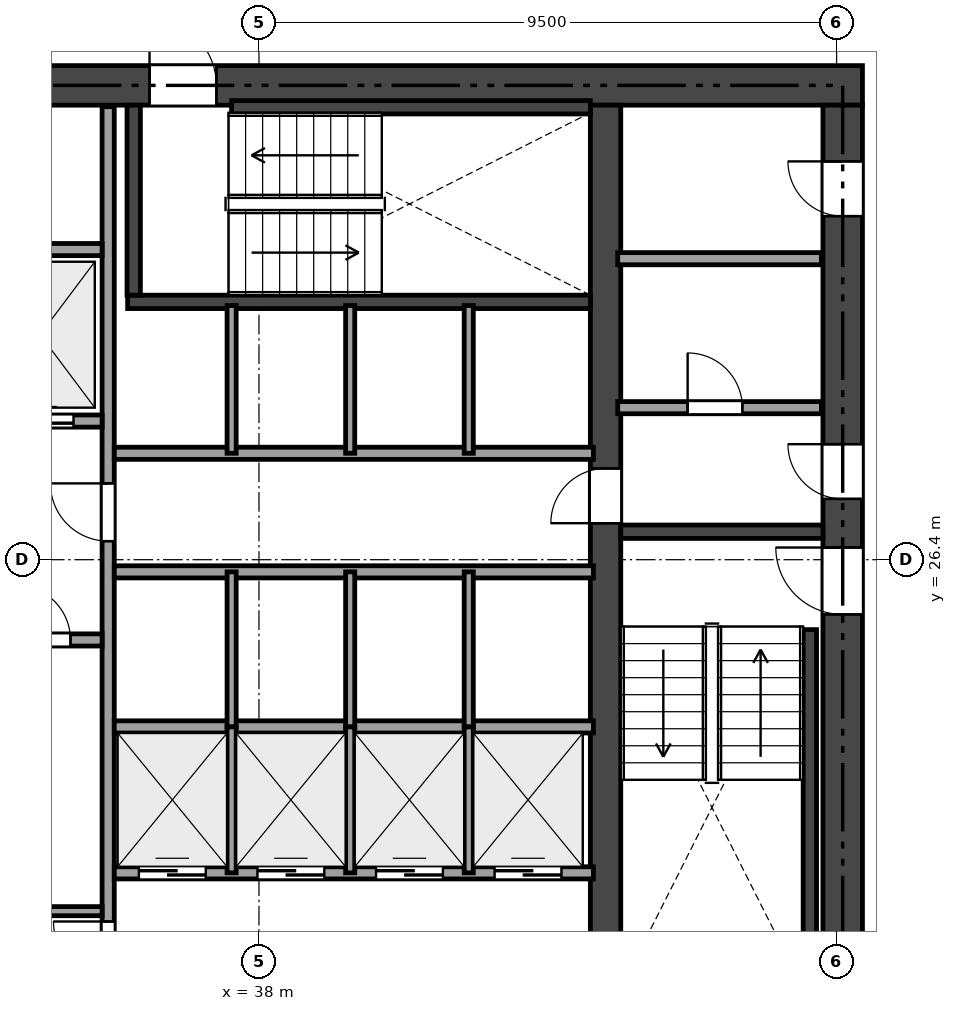
"""IFC4 building model, lengths in metres.
Left out: names, types, materials, properties, quantities, classifications, styles, units other than length and angle.
Written with IfcOpenShell. Run it as: python <this file> out.ifc"""

import sys

from ifc_helpers import new_model, si_unit, direction, frame, frame_2d, origin, place, context, subcontext, project, spatial, rectangle, extrude, element, fill, save


model = new_model("IFC4")
c1 = context("Model", 3, precision=1e-05, world=origin(), true_north=direction((0.0, 1.0)))
c2 = subcontext(c1, "Body", "Model", "MODEL_VIEW")
j1 = project(units=[si_unit("LENGTHUNIT", "METRE"), si_unit("PLANEANGLEUNIT", "RADIAN")], contexts=[c1])
p1 = place(None, origin())
s1 = spatial("IfcSite", under=j1, at=p1, CompositionType="ELEMENT")
p2 = place(p1, origin())
s2 = spatial("IfcBuilding", under=s1, at=p2, CompositionType="ELEMENT")
p3 = place(p2, frame((0.0, 0.0, 54.6)))
s3 = spatial("IfcBuildingStorey", under=s2, at=p3, CompositionType="ELEMENT", Elevation=54.6)
p4 = place(p3, frame((26.475, 34.2, 0.0), z_axis=(0.0, 0.0, 1.0), x_axis=(1.0, 0.0, 0.0)))
e1 = element("IfcWall", 1, at=p4, inside=s3, PredefinedType="SHEAR", context=c2, shape_type="SweptSolid", body=[
    extrude(rectangle(XDim=21.45, YDim=0.65, at=frame_2d((10.725, 0.0))), origin(), (0.0, 0.0, 1.0), 3.17),
])
p5 = place(p4, frame((9.725, 0.0, 0.0)))
e2 = element("IfcOpeningElement", 2, at=p5, cuts=e1, PredefinedType="OPENING", context=c2, shape_type="SweptSolid", body=[
    extrude(rectangle(XDim=1.1, YDim=2.15, at=frame_2d((0.55, 1.075))), frame((0.0, 0.335, 0.0), z_axis=(0.0, -1.0, 0.0), x_axis=(1.0, 0.0, 0.0)), (0.0, 0.0, 1.0), 0.67),
])
p6 = place(p4, frame((1.975, 0.0, 0.0)))
e3 = element("IfcOpeningElement", 3, at=p6, cuts=e1, PredefinedType="OPENING", context=c2, shape_type="SweptSolid", body=[
    extrude(rectangle(XDim=0.9, YDim=2.1, at=frame_2d((0.45, 1.05))), frame((0.0, 0.335, 0.0), z_axis=(0.0, -1.0, 0.0), x_axis=(1.0, 0.0, 0.0)), (0.0, 0.0, 1.0), 0.67),
])
p7 = place(p4, frame((6.275, 0.0, 0.0)))
e4 = element("IfcOpeningElement", 4, at=p7, cuts=e1, PredefinedType="OPENING", context=c2, shape_type="SweptSolid", body=[
    extrude(rectangle(XDim=0.9, YDim=2.1, at=frame_2d((0.45, 1.05))), frame((0.0, 0.335, 0.0), z_axis=(0.0, -1.0, 0.0), x_axis=(1.0, 0.0, 0.0)), (0.0, 0.0, 1.0), 0.67),
])
p8 = place(p3, frame((47.6, 18.925, 0.0), z_axis=(0.0, 0.0, 1.0), x_axis=(0.0, 1.0, 0.0)))
e5 = element("IfcWall", 5, at=p8, inside=s3, PredefinedType="SHEAR", context=c2, shape_type="SweptSolid", body=[
    extrude(rectangle(XDim=14.95, YDim=0.65, at=frame_2d((7.475, 0.0))), origin(), (0.0, 0.0, 1.0), 3.17),
])
p9 = place(p8, frame((6.575, 0.0, 0.0)))
e6 = element("IfcOpeningElement", 6, at=p9, cuts=e5, PredefinedType="OPENING", context=c2, shape_type="SweptSolid", body=[
    extrude(rectangle(XDim=1.1, YDim=2.15, at=frame_2d((0.55, 1.075))), frame((0.0, 0.335, 0.0), z_axis=(0.0, -1.0, 0.0), x_axis=(1.0, 0.0, 0.0)), (0.0, 0.0, 1.0), 0.67),
])
p10 = place(p8, frame((8.475, 0.0, 0.0)))
e7 = element("IfcOpeningElement", 7, at=p10, cuts=e5, PredefinedType="OPENING", context=c2, shape_type="SweptSolid", body=[
    extrude(rectangle(XDim=0.9, YDim=2.1, at=frame_2d((0.45, 1.05))), frame((0.0, 0.335, 0.0), z_axis=(0.0, -1.0, 0.0), x_axis=(1.0, 0.0, 0.0)), (0.0, 0.0, 1.0), 0.67),
])
p11 = place(p8, frame((13.125, 0.0, 0.0)))
e8 = element("IfcOpeningElement", 8, at=p11, cuts=e5, PredefinedType="OPENING", context=c2, shape_type="SweptSolid", body=[
    extrude(rectangle(XDim=0.9, YDim=2.1, at=frame_2d((0.45, 1.05))), frame((0.0, 0.335, 0.0), z_axis=(0.0, -1.0, 0.0), x_axis=(1.0, 0.0, 0.0)), (0.0, 0.0, 1.0), 0.67),
])
p12 = place(p3, frame((43.7, 18.925, 0.0), z_axis=(0.0, 0.0, 1.0), x_axis=(0.0, 1.0, 0.0)))
e9 = element("IfcWall", 9, at=p12, inside=s3, PredefinedType="SHEAR", context=c2, shape_type="SweptSolid", body=[
    extrude(rectangle(XDim=14.95, YDim=0.5, at=frame_2d((7.475, 0.0))), origin(), (0.0, 0.0, 1.0), 3.17),
])
p13 = place(p12, frame((8.075, 0.0, 0.0)))
e10 = element("IfcOpeningElement", 10, at=p13, cuts=e9, PredefinedType="OPENING", context=c2, shape_type="SweptSolid", body=[
    extrude(rectangle(XDim=0.9, YDim=2.1, at=frame_2d((0.45, 1.05))), frame((0.0, 0.26, 0.0), z_axis=(0.0, -1.0, 0.0), x_axis=(1.0, 0.0, 0.0)), (0.0, 0.0, 1.0), 0.52),
])
p14 = place(p3, frame((43.95, 26.86, 0.0), z_axis=(0.0, 0.0, 1.0), x_axis=(1.0, 0.0, 0.0)))
e11 = element("IfcWall", 11, at=p14, inside=s3, PredefinedType="SHEAR", context=c2, shape_type="SweptSolid", body=[
    extrude(rectangle(XDim=3.325, YDim=0.22, at=frame_2d((1.663, 0.0))), origin(), (0.0, 0.0, 1.0), 3.17),
])
p15 = place(p3, frame((47.06, 19.35, 0.0), z_axis=(0.0, 0.0, 1.0), x_axis=(0.0, 1.0, 0.0)))
e12 = element("IfcWall", 12, at=p15, inside=s3, PredefinedType="SHEAR", context=c2, shape_type="SweptSolid", body=[
    extrude(rectangle(XDim=5.9, YDim=0.22, at=frame_2d((2.95, 0.0))), origin(), (0.0, 0.0, 1.0), 3.17),
])
p16 = place(p3, frame((35.84, 30.64, 0.0), z_axis=(0.0, 0.0, 1.0), x_axis=(1.0, 0.0, 0.0)))
e13 = element("IfcWall", 13, at=p16, inside=s3, PredefinedType="SHEAR", context=c2, shape_type="SweptSolid", body=[
    extrude(rectangle(XDim=7.61, YDim=0.22, at=frame_2d((3.805, 0.0))), origin(), (0.0, 0.0, 1.0), 3.17),
])
p17 = place(p3, frame((35.94, 30.75, 0.0), z_axis=(0.0, 0.0, 1.0), x_axis=(0.0, 1.0, 0.0)))
e14 = element("IfcWall", 14, at=p17, inside=s3, PredefinedType="SHEAR", context=c2, shape_type="SweptSolid", body=[
    extrude(rectangle(XDim=3.125, YDim=0.22, at=frame_2d((1.562, 0.0))), origin(), (0.0, 0.0, 1.0), 3.17),
])
p18 = place(p3, frame((37.55, 33.84, 0.0), z_axis=(0.0, 0.0, 1.0), x_axis=(1.0, 0.0, 0.0)))
e15 = element("IfcWall", 15, at=p18, inside=s3, PredefinedType="SHEAR", context=c2, shape_type="SweptSolid", body=[
    extrude(rectangle(XDim=5.9, YDim=0.22, at=frame_2d((2.95, 0.0))), origin(), (0.0, 0.0, 1.0), 3.17),
])
p19 = place(p3, frame((43.9, 28.9, 0.0), z_axis=(0.0, 0.0, 1.0), x_axis=(1.0, 0.0, 0.0)))
e16 = element("IfcWall", 16, at=p19, inside=s3, PredefinedType="SOLIDWALL", context=c2, shape_type="SweptSolid", body=[
    extrude(rectangle(XDim=3.35, YDim=0.2, at=frame_2d((1.675, 0.0))), origin(), (0.0, 0.0, 1.0), 3.17),
])
p20 = place(p19, frame((1.15, 0.0, 0.0)))
e17 = element("IfcOpeningElement", 17, at=p20, cuts=e16, PredefinedType="OPENING", context=c2, shape_type="SweptSolid", body=[
    extrude(rectangle(XDim=0.9, YDim=2.1, at=frame_2d((0.45, 1.05))), frame((0.0, 0.11, 0.0), z_axis=(0.0, -1.0, 0.0), x_axis=(1.0, 0.0, 0.0)), (0.0, 0.0, 1.0), 0.22),
])
p21 = place(p3, frame((43.9, 31.35, 0.0), z_axis=(0.0, 0.0, 1.0), x_axis=(1.0, 0.0, 0.0)))
e18 = element("IfcWall", 18, at=p21, inside=s3, PredefinedType="SOLIDWALL", context=c2, shape_type="SweptSolid", body=[
    extrude(rectangle(XDim=3.35, YDim=0.2, at=frame_2d((1.675, 0.0))), origin(), (0.0, 0.0, 1.0), 3.17),
])
p22 = place(p3, frame((35.52, 18.95, 0.0), z_axis=(0.0, 0.0, 1.0), x_axis=(0.0, 1.0, 0.0)))
e19 = element("IfcWall", 19, at=p22, inside=s3, PredefinedType="SOLIDWALL", context=c2, shape_type="SweptSolid", body=[
    extrude(rectangle(XDim=14.9, YDim=0.2, at=frame_2d((7.45, 0.0))), origin(), (0.0, 0.0, 1.0), 2.691),
])
p23 = place(p22, frame((7.755, 0.0, 0.0)))
e20 = element("IfcOpeningElement", 20, at=p23, cuts=e19, PredefinedType="OPENING", context=c2, shape_type="SweptSolid", body=[
    extrude(rectangle(XDim=0.95, YDim=2.15, at=frame_2d((0.475, 1.075))), frame((0.0, 0.11, 0.0), z_axis=(0.0, -1.0, 0.0), x_axis=(1.0, 0.0, 0.0)), (0.0, 0.0, 1.0), 0.22),
])
p24 = place(p22, frame((0.6, 0.0, 0.0)))
e21 = element("IfcOpeningElement", 21, at=p24, cuts=e19, PredefinedType="OPENING", context=c2, shape_type="SweptSolid", body=[
    extrude(rectangle(XDim=0.9, YDim=2.1, at=frame_2d((0.45, 1.05))), frame((0.0, 0.11, 0.0), z_axis=(0.0, -1.0, 0.0), x_axis=(1.0, 0.0, 0.0)), (0.0, 0.0, 1.0), 0.22),
])
p25 = place(p3, frame((31.0, 28.68, 0.0), z_axis=(0.0, 0.0, 1.0), x_axis=(1.0, 0.0, 0.0)))
e22 = element("IfcWall", 22, at=p25, inside=s3, PredefinedType="SOLIDWALL", context=c2, shape_type="SweptSolid", body=[
    extrude(rectangle(XDim=4.42, YDim=0.2, at=frame_2d((2.21, 0.0))), origin(), (0.0, 0.0, 1.0), 3.17),
])
p26 = place(p25, frame((0.6, 0.0, 0.0)))
e23 = element("IfcOpeningElement", 23, at=p26, cuts=e22, PredefinedType="OPENING", context=c2, shape_type="SweptSolid", body=[
    extrude(rectangle(XDim=1.1, YDim=2.15, at=frame_2d((0.55, 1.075))), frame((0.0, 0.11, 0.0), z_axis=(0.0, -1.0, 0.0), x_axis=(1.0, 0.0, 0.0)), (0.0, 0.0, 1.0), 0.22),
])
p27 = place(p25, frame((2.85, 0.0, 0.0)))
e24 = element("IfcOpeningElement", 24, at=p27, cuts=e22, PredefinedType="OPENING", context=c2, shape_type="SweptSolid", body=[
    extrude(rectangle(XDim=1.1, YDim=2.15, at=frame_2d((0.55, 1.075))), frame((0.0, 0.11, 0.0), z_axis=(0.0, -1.0, 0.0), x_axis=(1.0, 0.0, 0.0)), (0.0, 0.0, 1.0), 0.22),
])
p28 = place(p3, frame((31.0, 31.5, 0.0), z_axis=(0.0, 0.0, 1.0), x_axis=(1.0, 0.0, 0.0)))
e25 = element("IfcWall", 25, at=p28, inside=s3, PredefinedType="SOLIDWALL", context=c2, shape_type="SweptSolid", body=[
    extrude(rectangle(XDim=4.42, YDim=0.2, at=frame_2d((2.21, 0.0))), origin(), (0.0, 0.0, 1.0), 3.17),
])
p29 = place(p3, frame((31.0, 25.08, 0.0), z_axis=(0.0, 0.0, 1.0), x_axis=(1.0, 0.0, 0.0)))
e26 = element("IfcWall", 26, at=p29, inside=s3, PredefinedType="SOLIDWALL", context=c2, shape_type="SweptSolid", body=[
    extrude(rectangle(XDim=4.42, YDim=0.2, at=frame_2d((2.21, 0.0))), origin(), (0.0, 0.0, 1.0), 3.17),
])
p30 = place(p29, frame((3.0, 0.0, 0.0)))
e27 = element("IfcOpeningElement", 27, at=p30, cuts=e26, PredefinedType="OPENING", context=c2, shape_type="SweptSolid", body=[
    extrude(rectangle(XDim=0.9, YDim=2.1, at=frame_2d((0.45, 1.05))), frame((0.0, 0.11, 0.0), z_axis=(0.0, -1.0, 0.0), x_axis=(1.0, 0.0, 0.0)), (0.0, 0.0, 1.0), 0.22),
])
p31 = place(p29, frame((0.62, 0.0, 0.0)))
e28 = element("IfcOpeningElement", 28, at=p31, cuts=e26, PredefinedType="OPENING", context=c2, shape_type="SweptSolid", body=[
    extrude(rectangle(XDim=1.2, YDim=2.15, at=frame_2d((0.6, 1.075))), frame((0.0, 0.11, 0.0), z_axis=(0.0, -1.0, 0.0), x_axis=(1.0, 0.0, 0.0)), (0.0, 0.0, 1.0), 0.22),
])
p32 = place(p3, frame((33.42, 20.62, 0.0), z_axis=(0.0, 0.0, 1.0), x_axis=(1.0, 0.0, 0.0)))
e29 = element("IfcWall", 29, at=p32, inside=s3, PredefinedType="PARTITIONING", context=c2, shape_type="SweptSolid", body=[
    extrude(rectangle(XDim=2.0, YDim=0.15, at=frame_2d((1.0, 0.0))), origin(), (0.0, 0.0, 1.0), 3.17),
])
for number, where, z_axis, x_axis in (
    (30, (35.62, 28.15, 0.0), (0.0, 0.0, 1.0), (1.0, 0.0, 0.0)),
    (31, (35.62, 26.2, 0.0), (0.0, 0.0, 1.0), (1.0, 0.0, 0.0)),
):
    element("IfcWall", number, at=place(p3, frame(where, z_axis=z_axis, x_axis=x_axis)), inside=s3, PredefinedType="SOLIDWALL", context=c2, shape_type="SweptSolid", body=[
        extrude(rectangle(XDim=7.88, YDim=0.2, at=frame_2d((3.94, 0.0))), origin(), (0.0, 0.0, 1.0), 3.17),
    ])
p33 = place(p3, frame((35.62, 23.65, 0.0), z_axis=(0.0, 0.0, 1.0), x_axis=(1.0, 0.0, 0.0)))
e32 = element("IfcWall", 32, at=p33, inside=s3, PredefinedType="SOLIDWALL", context=c2, shape_type="SweptSolid", body=[
    extrude(rectangle(XDim=7.88, YDim=0.2, at=frame_2d((3.94, 0.0))), origin(), (0.0, 0.0, 1.0), 2.691),
])
p34 = place(p3, frame((35.62, 21.25, 0.0), z_axis=(0.0, 0.0, 1.0), x_axis=(1.0, 0.0, 0.0)))
e33 = element("IfcWall", 33, at=p34, inside=s3, PredefinedType="SOLIDWALL", context=c2, shape_type="SweptSolid", body=[
    extrude(rectangle(XDim=7.88, YDim=0.2, at=frame_2d((3.94, 0.0))), origin(), (0.0, 0.0, 1.0), 3.17),
])
p35 = place(p34, frame((0.405, 0.0, 0.0)))
e34 = element("IfcOpeningElement", 34, at=p35, cuts=e33, PredefinedType="OPENING", context=c2, shape_type="SweptSolid", body=[
    extrude(rectangle(XDim=1.1, YDim=2.15, at=frame_2d((0.55, 1.075))), frame((0.0, 0.11, 0.0), z_axis=(0.0, -1.0, 0.0), x_axis=(1.0, 0.0, 0.0)), (0.0, 0.0, 1.0), 0.22),
])
p36 = place(p34, frame((2.355, 0.0, 0.0)))
e35 = element("IfcOpeningElement", 35, at=p36, cuts=e33, PredefinedType="OPENING", context=c2, shape_type="SweptSolid", body=[
    extrude(rectangle(XDim=1.1, YDim=2.15, at=frame_2d((0.55, 1.075))), frame((0.0, 0.11, 0.0), z_axis=(0.0, -1.0, 0.0), x_axis=(1.0, 0.0, 0.0)), (0.0, 0.0, 1.0), 0.22),
])
p37 = place(p34, frame((4.305, 0.0, 0.0)))
e36 = element("IfcOpeningElement", 36, at=p37, cuts=e33, PredefinedType="OPENING", context=c2, shape_type="SweptSolid", body=[
    extrude(rectangle(XDim=1.1, YDim=2.15, at=frame_2d((0.55, 1.075))), frame((0.0, 0.11, 0.0), z_axis=(0.0, -1.0, 0.0), x_axis=(1.0, 0.0, 0.0)), (0.0, 0.0, 1.0), 0.22),
])
p38 = place(p34, frame((6.255, 0.0, 0.0)))
e37 = element("IfcOpeningElement", 37, at=p38, cuts=e33, PredefinedType="OPENING", context=c2, shape_type="SweptSolid", body=[
    extrude(rectangle(XDim=1.1, YDim=2.15, at=frame_2d((0.55, 1.075))), frame((0.0, 0.11, 0.0), z_axis=(0.0, -1.0, 0.0), x_axis=(1.0, 0.0, 0.0)), (0.0, 0.0, 1.0), 0.22),
])
for number, where, z_axis, x_axis in (
    (38, (37.55, 28.15, 0.0), (0.0, 0.0, 1.0), (0.0, 1.0, 0.0)),
    (39, (39.5, 28.15, 0.0), (0.0, 0.0, 1.0), (0.0, 1.0, 0.0)),
    (40, (41.45, 28.15, 0.0), (0.0, 0.0, 1.0), (0.0, 1.0, 0.0)),
):
    element("IfcWall", number, at=place(p3, frame(where, z_axis=z_axis, x_axis=x_axis)), inside=s3, PredefinedType="PARTITIONING", context=c2, shape_type="SweptSolid", body=[
        extrude(rectangle(XDim=2.43, YDim=0.15, at=frame_2d((1.215, 0.0))), origin(), (0.0, 0.0, 1.0), 3.17),
    ])
for number, where, z_axis, x_axis in (
    (41, (37.55, 23.65, 0.0), (0.0, 0.0, 1.0), (0.0, 1.0, 0.0)),
    (42, (39.5, 23.65, 0.0), (0.0, 0.0, 1.0), (0.0, 1.0, 0.0)),
    (43, (41.45, 23.65, 0.0), (0.0, 0.0, 1.0), (0.0, 1.0, 0.0)),
):
    element("IfcWall", number, at=place(p3, frame(where, z_axis=z_axis, x_axis=x_axis)), inside=s3, PredefinedType="PARTITIONING", context=c2, shape_type="SweptSolid", body=[
        extrude(rectangle(XDim=2.55, YDim=0.15, at=frame_2d((1.275, 0.0))), origin(), (0.0, 0.0, 1.0), 2.691),
    ])
for number, where, z_axis, x_axis in (
    (44, (37.55, 21.25, 0.0), (0.0, 0.0, 1.0), (0.0, 1.0, 0.0)),
    (45, (39.5, 21.25, 0.0), (0.0, 0.0, 1.0), (0.0, 1.0, 0.0)),
    (46, (41.45, 21.25, 0.0), (0.0, 0.0, 1.0), (0.0, 1.0, 0.0)),
):
    element("IfcWall", number, at=place(p3, frame(where, z_axis=z_axis, x_axis=x_axis)), inside=s3, PredefinedType="PARTITIONING", context=c2, shape_type="SweptSolid", body=[
        extrude(rectangle(XDim=2.4, YDim=0.15, at=frame_2d((1.2, 0.0))), origin(), (0.0, 0.0, 1.0), 2.691),
    ])
p39 = place(p9, origin())
e47 = element("IfcDoor", 47, at=p39, inside=s3, OperationType="SINGLE_SWING_RIGHT", PredefinedType="DOOR", context=c2, shape_type="SweptSolid", body=[
    extrude(rectangle(XDim=1.1, YDim=2.15, at=frame_2d((0.55, 1.075))), frame((0.0, 0.025, 0.0), z_axis=(0.0, -1.0, 0.0), x_axis=(1.0, 0.0, 0.0)), (0.0, 0.0, 1.0), 0.05),
])
fill(e6, e47)
p40 = place(p5, origin())
e48 = element("IfcDoor", 48, at=p40, inside=s3, OperationType="SINGLE_SWING_LEFT", PredefinedType="DOOR", context=c2, shape_type="SweptSolid", body=[
    extrude(rectangle(XDim=1.1, YDim=2.15, at=frame_2d((0.55, 1.075))), frame((0.0, 0.025, 0.0), z_axis=(0.0, -1.0, 0.0), x_axis=(1.0, 0.0, 0.0)), (0.0, 0.0, 1.0), 0.05),
])
fill(e2, e48)
p41 = place(p23, origin())
e49 = element("IfcDoor", 49, at=p41, inside=s3, OperationType="SINGLE_SWING_RIGHT", PredefinedType="DOOR", context=c2, shape_type="SweptSolid", body=[
    extrude(rectangle(XDim=0.95, YDim=2.15, at=frame_2d((0.475, 1.075))), frame((0.0, 0.025, 0.0), z_axis=(0.0, -1.0, 0.0), x_axis=(1.0, 0.0, 0.0)), (0.0, 0.0, 1.0), 0.05),
])
fill(e20, e49)
p42 = place(p13, origin())
e50 = element("IfcDoor", 50, at=p42, inside=s3, OperationType="SINGLE_SWING_LEFT", PredefinedType="DOOR", context=c2, shape_type="SweptSolid", body=[
    extrude(rectangle(XDim=0.9, YDim=2.1, at=frame_2d((0.45, 1.05))), frame((0.0, 0.025, 0.0), z_axis=(0.0, -1.0, 0.0), x_axis=(1.0, 0.0, 0.0)), (0.0, 0.0, 1.0), 0.05),
])
fill(e10, e50)
p43 = place(p10, origin())
e51 = element("IfcDoor", 51, at=p43, inside=s3, OperationType="SINGLE_SWING_RIGHT", PredefinedType="DOOR", context=c2, shape_type="SweptSolid", body=[
    extrude(rectangle(XDim=0.9, YDim=2.1, at=frame_2d((0.45, 1.05))), frame((0.0, 0.025, 0.0), z_axis=(0.0, -1.0, 0.0), x_axis=(1.0, 0.0, 0.0)), (0.0, 0.0, 1.0), 0.05),
])
fill(e7, e51)
p44 = place(p20, origin())
e52 = element("IfcDoor", 52, at=p44, inside=s3, OperationType="SINGLE_SWING_LEFT", PredefinedType="DOOR", context=c2, shape_type="SweptSolid", body=[
    extrude(rectangle(XDim=0.9, YDim=2.1, at=frame_2d((0.45, 1.05))), frame((0.0, 0.025, 0.0), z_axis=(0.0, -1.0, 0.0), x_axis=(1.0, 0.0, 0.0)), (0.0, 0.0, 1.0), 0.05),
])
fill(e17, e52)
p45 = place(p11, origin())
e53 = element("IfcDoor", 53, at=p45, inside=s3, OperationType="SINGLE_SWING_RIGHT", PredefinedType="DOOR", context=c2, shape_type="SweptSolid", body=[
    extrude(rectangle(XDim=0.9, YDim=2.1, at=frame_2d((0.45, 1.05))), frame((0.0, 0.025, 0.0), z_axis=(0.0, -1.0, 0.0), x_axis=(1.0, 0.0, 0.0)), (0.0, 0.0, 1.0), 0.05),
])
fill(e8, e53)
p46 = place(p24, origin())
e54 = element("IfcDoor", 54, at=p46, inside=s3, OperationType="SINGLE_SWING_RIGHT", PredefinedType="DOOR", context=c2, shape_type="SweptSolid", body=[
    extrude(rectangle(XDim=0.9, YDim=2.1, at=frame_2d((0.45, 1.05))), frame((0.0, 0.025, 0.0), z_axis=(0.0, -1.0, 0.0), x_axis=(1.0, 0.0, 0.0)), (0.0, 0.0, 1.0), 0.05),
])
fill(e21, e54)
p47 = place(p30, origin())
e55 = element("IfcDoor", 55, at=p47, inside=s3, OperationType="SINGLE_SWING_LEFT", PredefinedType="DOOR", context=c2, shape_type="SweptSolid", body=[
    extrude(rectangle(XDim=0.9, YDim=2.1, at=frame_2d((0.45, 1.05))), frame((0.0, 0.025, 0.0), z_axis=(0.0, -1.0, 0.0), x_axis=(1.0, 0.0, 0.0)), (0.0, 0.0, 1.0), 0.05),
])
fill(e27, e55)
p48 = place(p27, origin())
e56 = element("IfcDoor", 56, at=p48, inside=s3, OperationType="SLIDING_TO_LEFT", PredefinedType="DOOR", context=c2, shape_type="SweptSolid", body=[
    extrude(rectangle(XDim=1.1, YDim=2.15, at=frame_2d((0.55, 1.075))), frame((0.0, 0.025, 0.0), z_axis=(0.0, -1.0, 0.0), x_axis=(1.0, 0.0, 0.0)), (0.0, 0.0, 1.0), 0.05),
])
fill(e24, e56)
p49 = place(p35, origin())
e57 = element("IfcDoor", 57, at=p49, inside=s3, OperationType="SLIDING_TO_LEFT", PredefinedType="DOOR", context=c2, shape_type="SweptSolid", body=[
    extrude(rectangle(XDim=1.1, YDim=2.15, at=frame_2d((0.55, 1.075))), frame((0.0, 0.025, 0.0), z_axis=(0.0, -1.0, 0.0), x_axis=(1.0, 0.0, 0.0)), (0.0, 0.0, 1.0), 0.05),
])
fill(e34, e57)
p50 = place(p36, origin())
e58 = element("IfcDoor", 58, at=p50, inside=s3, OperationType="SLIDING_TO_LEFT", PredefinedType="DOOR", context=c2, shape_type="SweptSolid", body=[
    extrude(rectangle(XDim=1.1, YDim=2.15, at=frame_2d((0.55, 1.075))), frame((0.0, 0.025, 0.0), z_axis=(0.0, -1.0, 0.0), x_axis=(1.0, 0.0, 0.0)), (0.0, 0.0, 1.0), 0.05),
])
fill(e35, e58)
p51 = place(p37, origin())
e59 = element("IfcDoor", 59, at=p51, inside=s3, OperationType="SLIDING_TO_LEFT", PredefinedType="DOOR", context=c2, shape_type="SweptSolid", body=[
    extrude(rectangle(XDim=1.1, YDim=2.15, at=frame_2d((0.55, 1.075))), frame((0.0, 0.025, 0.0), z_axis=(0.0, -1.0, 0.0), x_axis=(1.0, 0.0, 0.0)), (0.0, 0.0, 1.0), 0.05),
])
fill(e36, e59)
p52 = place(p38, origin())
e60 = element("IfcDoor", 60, at=p52, inside=s3, OperationType="SLIDING_TO_LEFT", PredefinedType="DOOR", context=c2, shape_type="SweptSolid", body=[
    extrude(rectangle(XDim=1.1, YDim=2.15, at=frame_2d((0.55, 1.075))), frame((0.0, 0.025, 0.0), z_axis=(0.0, -1.0, 0.0), x_axis=(1.0, 0.0, 0.0)), (0.0, 0.0, 1.0), 0.05),
])
fill(e37, e60)
save(model, sys.argv[1])
